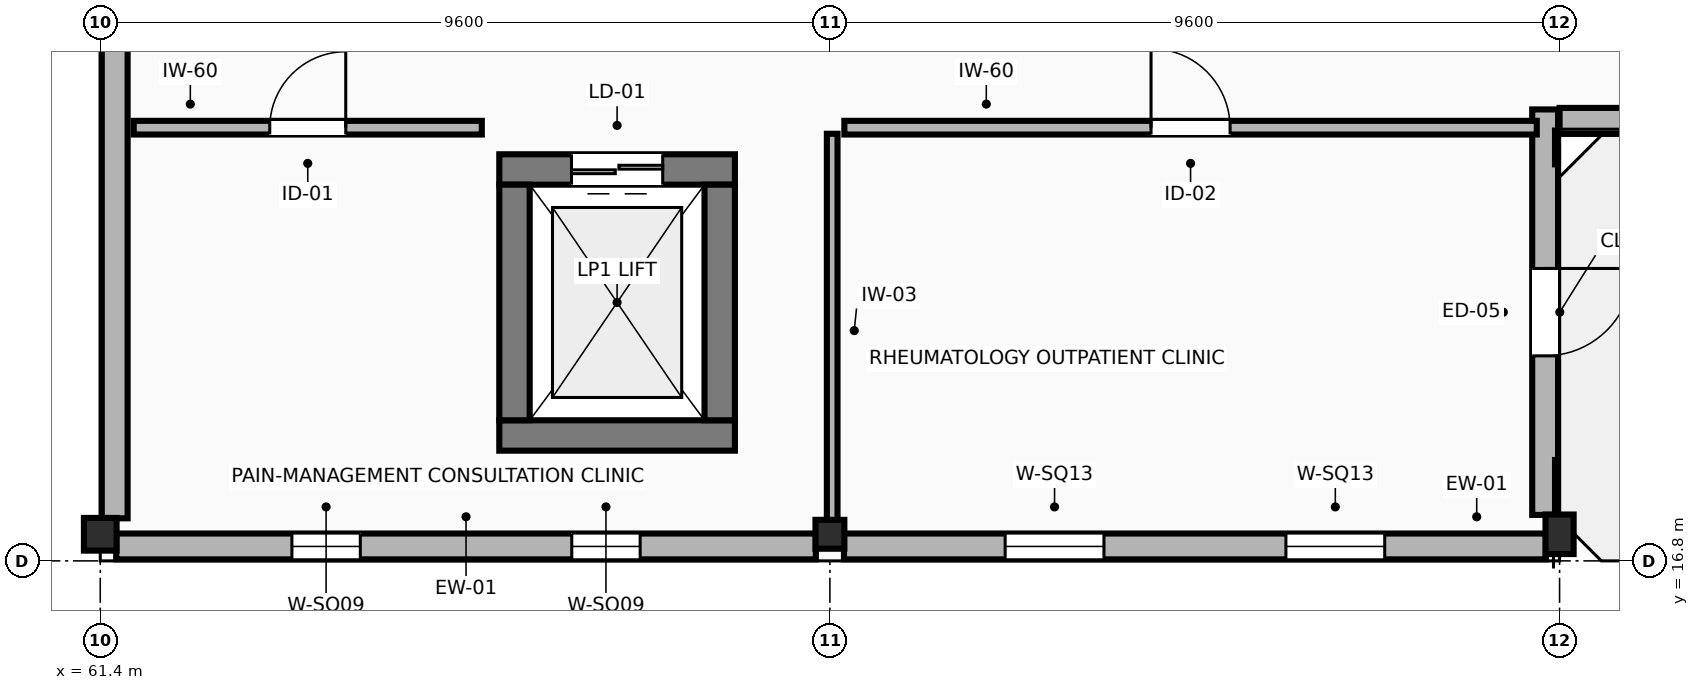
"""IFC4 building model, lengths in metres.
Left out: names, types, materials, properties, quantities, classifications, styles, units other than length and angle.
Written with IfcOpenShell. Run it as: python <this file> out.ifc"""

import sys

from ifc_helpers import new_model, si_unit, direction, frame, frame_2d, origin, origin_2d, place, context, subcontext, project, spatial, rectangle, extrude, element, fill, save


model = new_model("IFC4")
c1 = context("Model", 3, precision=1e-05, world=origin(), true_north=direction((0.0, 1.0)))
c2 = subcontext(c1, "Body", "Model", "MODEL_VIEW")
j1 = project(units=[si_unit("LENGTHUNIT", "METRE"), si_unit("PLANEANGLEUNIT", "RADIAN")], contexts=[c1])
p1 = place(None, origin())
s1 = spatial("IfcSite", under=j1, at=p1, CompositionType="ELEMENT")
p2 = place(p1, origin())
s2 = spatial("IfcBuilding", under=s1, at=p2, CompositionType="ELEMENT")
p3 = place(p2, frame((0.0, 0.0, 18.0)))
s3 = spatial("IfcBuildingStorey", under=s2, at=p3, CompositionType="ELEMENT", Elevation=18.0)
p4 = place(p3, frame((61.4, 17.15, 0.0), z_axis=(0.0, 0.0, 1.0), x_axis=(1.0, 0.0, 0.0)))
e1 = element("IfcColumn", 1, at=p4, inside=s3, PredefinedType="COLUMN", context=c2, shape_type="SweptSolid", body=[
    extrude(rectangle(XDim=0.43, YDim=0.43, at=origin_2d()), origin(), (0.0, 0.0, 1.0), 4.2),
])
p5 = place(p3, frame((71.0, 17.15, 0.0), z_axis=(0.0, 0.0, 1.0), x_axis=(1.0, 0.0, 0.0)))
e2 = element("IfcColumn", 2, at=p5, inside=s3, PredefinedType="COLUMN", context=c2, shape_type="SweptSolid", body=[
    extrude(rectangle(XDim=0.38, YDim=0.38, at=origin_2d()), origin(), (0.0, 0.0, 1.0), 4.2),
])
p6 = place(p3, frame((80.6, 17.15, 0.0), z_axis=(0.0, 0.0, 1.0), x_axis=(1.0, 0.0, 0.0)))
e3 = element("IfcColumn", 3, at=p6, inside=s3, PredefinedType="COLUMN", context=c2, shape_type="SweptSolid", body=[
    extrude(rectangle(XDim=0.37, YDim=0.52, at=origin_2d()), origin(), (0.0, 0.0, 1.0), 4.2),
])
p7 = place(p3, frame((61.61, 16.99, 0.0), z_axis=(0.0, 0.0, 1.0), x_axis=(1.0, 0.0, 0.0)))
e4 = element("IfcWall", 4, at=p7, inside=s3, PredefinedType="STANDARD", context=c2, shape_type="SweptSolid", body=[
    extrude(rectangle(XDim=9.205, YDim=0.34, at=frame_2d((4.603, 0.0))), origin(), (0.0, 0.0, 1.0), 3.205),
])
p8 = place(p7, frame((2.312, 0.0, 0.95)))
e5 = element("IfcOpeningElement", 5, at=p8, cuts=e4, PredefinedType="OPENING", context=c2, shape_type="SweptSolid", body=[
    extrude(rectangle(XDim=0.9, YDim=0.9, at=frame_2d((0.45, 0.45))), frame((0.0, 0.18, 0.0), z_axis=(0.0, -1.0, 0.0), x_axis=(1.0, 0.0, 0.0)), (0.0, 0.0, 1.0), 0.36),
])
p9 = place(p7, frame((5.993, 0.0, 0.95)))
e6 = element("IfcOpeningElement", 6, at=p9, cuts=e4, PredefinedType="OPENING", context=c2, shape_type="SweptSolid", body=[
    extrude(rectangle(XDim=0.9, YDim=0.9, at=frame_2d((0.45, 0.45))), frame((0.0, 0.18, 0.0), z_axis=(0.0, -1.0, 0.0), x_axis=(1.0, 0.0, 0.0)), (0.0, 0.0, 1.0), 0.36),
])
p10 = place(p3, frame((71.185, 16.99, 0.0), z_axis=(0.0, 0.0, 1.0), x_axis=(1.0, 0.0, 0.0)))
e7 = element("IfcWall", 7, at=p10, inside=s3, PredefinedType="STANDARD", context=c2, shape_type="SweptSolid", body=[
    extrude(rectangle(XDim=9.235, YDim=0.34, at=frame_2d((4.617, 0.0))), origin(), (0.0, 0.0, 1.0), 3.205),
])
p11 = place(p10, frame((2.121, 0.0, 1.15)))
e8 = element("IfcOpeningElement", 8, at=p11, cuts=e7, PredefinedType="OPENING", context=c2, shape_type="SweptSolid", body=[
    extrude(rectangle(XDim=1.3, YDim=1.3, at=frame_2d((0.65, 0.65))), frame((0.0, 0.18, 0.0), z_axis=(0.0, -1.0, 0.0), x_axis=(1.0, 0.0, 0.0)), (0.0, 0.0, 1.0), 0.36),
])
p12 = place(p10, frame((5.814, 0.0, 1.15)))
e9 = element("IfcOpeningElement", 9, at=p12, cuts=e7, PredefinedType="OPENING", context=c2, shape_type="SweptSolid", body=[
    extrude(rectangle(XDim=1.3, YDim=1.3, at=frame_2d((0.65, 0.65))), frame((0.0, 0.18, 0.0), z_axis=(0.0, -1.0, 0.0), x_axis=(1.0, 0.0, 0.0)), (0.0, 0.0, 1.0), 0.36),
])
p13 = place(p3, frame((80.41, 17.405, 0.0), z_axis=(0.0, 0.0, 1.0), x_axis=(0.0, 1.0, 0.0)))
e10 = element("IfcWall", 10, at=p13, inside=s3, PredefinedType="STANDARD", context=c2, shape_type="SweptSolid", body=[
    extrude(rectangle(XDim=5.335, YDim=0.34, at=frame_2d((2.667, 0.0))), origin(), (0.0, 0.0, 1.0), 3.425),
])
p14 = place(p13, frame((2.093, 0.0, 0.0)))
e11 = element("IfcOpeningElement", 11, at=p14, cuts=e10, PredefinedType="OPENING", context=c2, shape_type="SweptSolid", body=[
    extrude(rectangle(XDim=1.15, YDim=2.2, at=frame_2d((0.575, 1.1))), frame((0.0, 0.18, 0.0), z_axis=(0.0, -1.0, 0.0), x_axis=(1.0, 0.0, 0.0)), (0.0, 0.0, 1.0), 0.36),
])
p15 = place(p3, frame((80.6, 22.59, 0.0), z_axis=(0.0, 0.0, 1.0), x_axis=(1.0, 0.0, 0.0)))
e12 = element("IfcWall", 12, at=p15, inside=s3, PredefinedType="STANDARD", context=c2, shape_type="SweptSolid", body=[
    extrude(rectangle(XDim=9.6, YDim=0.34, at=frame_2d((4.8, 0.0))), origin(), (0.0, 0.0, 1.0), 3.94),
])
p16 = place(p15, frame((2.205, 0.0, 0.95)))
e13 = element("IfcOpeningElement", 13, at=p16, cuts=e12, PredefinedType="OPENING", context=c2, shape_type="SweptSolid", body=[
    extrude(rectangle(XDim=1.35, YDim=1.6, at=frame_2d((0.675, 0.8))), frame((0.0, 0.18, 0.0), z_axis=(0.0, -1.0, 0.0), x_axis=(1.0, 0.0, 0.0)), (0.0, 0.0, 1.0), 0.36),
])
p17 = place(p15, frame((6.045, 0.0, 0.95)))
e14 = element("IfcOpeningElement", 14, at=p17, cuts=e12, PredefinedType="OPENING", context=c2, shape_type="SweptSolid", body=[
    extrude(rectangle(XDim=1.35, YDim=1.6, at=frame_2d((0.675, 0.8))), frame((0.0, 0.18, 0.0), z_axis=(0.0, -1.0, 0.0), x_axis=(1.0, 0.0, 0.0)), (0.0, 0.0, 1.0), 0.36),
])
p18 = place(p3, frame((61.59, 25.555, 0.0), z_axis=(0.0, 0.0, 1.0), x_axis=(0.0, -1.0, 0.0)))
e15 = element("IfcWall", 15, at=p18, inside=s3, PredefinedType="STANDARD", context=c2, shape_type="SweptSolid", body=[
    extrude(rectangle(XDim=8.195, YDim=0.34, at=frame_2d((4.097, 0.0))), origin(), (0.0, 0.0, 1.0), 2.985),
])
p19 = place(p3, frame((66.65, 18.45, 0.0), z_axis=(0.0, 0.0, 1.0), x_axis=(1.0, 0.0, 0.0)))
e16 = element("IfcWall", 16, at=p19, inside=s3, PredefinedType="SHEAR", context=c2, shape_type="SweptSolid", body=[
    extrude(rectangle(XDim=3.1, YDim=0.4, at=frame_2d((1.55, 0.0))), origin(), (0.0, 0.0, 1.0), 4.2),
])
p20 = place(p3, frame((69.75, 21.95, 0.0), z_axis=(0.0, 0.0, 1.0), x_axis=(-1.0, 0.0, 0.0)))
e17 = element("IfcWall", 17, at=p20, inside=s3, PredefinedType="SHEAR", context=c2, shape_type="SweptSolid", body=[
    extrude(rectangle(XDim=3.1, YDim=0.4, at=frame_2d((1.55, 0.0))), origin(), (0.0, 0.0, 1.0), 4.2),
])
p21 = place(p20, frame((0.95, 0.0, 0.0)))
e18 = element("IfcOpeningElement", 18, at=p21, cuts=e17, PredefinedType="OPENING", context=c2, shape_type="SweptSolid", body=[
    extrude(rectangle(XDim=1.2, YDim=2.2, at=frame_2d((0.6, 1.1))), frame((0.0, 0.21, 0.0), z_axis=(0.0, -1.0, 0.0), x_axis=(1.0, 0.0, 0.0)), (0.0, 0.0, 1.0), 0.42),
])
for number, where, z_axis, x_axis in (
    (19, (66.85, 18.65, 0.0), (0.0, 0.0, 1.0), (0.0, 1.0, 0.0)),
    (20, (69.55, 21.75, 0.0), (0.0, 0.0, 1.0), (0.0, -1.0, 0.0)),
):
    element("IfcWall", number, at=place(p3, frame(where, z_axis=z_axis, x_axis=x_axis)), inside=s3, PredefinedType="SHEAR", context=c2, shape_type="SweptSolid", body=[
        extrude(rectangle(XDim=3.1, YDim=0.4, at=frame_2d((1.55, 0.0))), origin(), (0.0, 0.0, 1.0), 4.2),
    ])
p22 = place(p3, frame((61.84, 22.5, 0.0), z_axis=(0.0, 0.0, 1.0), x_axis=(1.0, 0.0, 0.0)))
e21 = element("IfcWall", 21, at=p22, inside=s3, PredefinedType="PARTITIONING", context=c2, shape_type="SweptSolid", body=[
    extrude(rectangle(XDim=4.58, YDim=0.18, at=frame_2d((2.29, 0.0))), origin(), (0.0, 0.0, 1.0), 3.94),
])
p23 = place(p22, frame((1.79, 0.0, 0.0)))
e22 = element("IfcOpeningElement", 22, at=p23, cuts=e21, PredefinedType="OPENING", context=c2, shape_type="SweptSolid", body=[
    extrude(rectangle(XDim=1.0, YDim=2.15, at=frame_2d((0.5, 1.075))), frame((0.0, 0.1, 0.0), z_axis=(0.0, -1.0, 0.0), x_axis=(1.0, 0.0, 0.0)), (0.0, 0.0, 1.0), 0.2),
])
p24 = place(p3, frame((71.03, 22.42, 0.0), z_axis=(0.0, 0.0, 1.0), x_axis=(0.0, -1.0, 0.0)))
e23 = element("IfcWall", 23, at=p24, inside=s3, PredefinedType="PARTITIONING", context=c2, shape_type="SweptSolid", body=[
    extrude(rectangle(XDim=5.18, YDim=0.14, at=frame_2d((2.59, 0.0))), origin(), (0.0, 0.0, 1.0), 3.425),
])
p25 = place(p3, frame((71.19, 22.5, 0.0), z_axis=(0.0, 0.0, 1.0), x_axis=(1.0, 0.0, 0.0)))
e24 = element("IfcWall", 24, at=p25, inside=s3, PredefinedType="PARTITIONING", context=c2, shape_type="SweptSolid", body=[
    extrude(rectangle(XDim=9.11, YDim=0.18, at=frame_2d((4.555, 0.0))), origin(), (0.0, 0.0, 1.0), 3.94),
])
p26 = place(p25, frame((4.035, 0.0, 0.0)))
e25 = element("IfcOpeningElement", 25, at=p26, cuts=e24, PredefinedType="OPENING", context=c2, shape_type="SweptSolid", body=[
    extrude(rectangle(XDim=1.04, YDim=2.15, at=frame_2d((0.52, 1.075))), frame((0.0, 0.1, 0.0), z_axis=(0.0, -1.0, 0.0), x_axis=(1.0, 0.0, 0.0)), (0.0, 0.0, 1.0), 0.2),
])
p27 = place(p8, origin())
e26 = element("IfcWindow", 26, at=p27, inside=s3, PartitioningType="SINGLE_PANEL", PredefinedType="WINDOW", context=c2, shape_type="SweptSolid", body=[
    extrude(rectangle(XDim=0.9, YDim=0.9, at=frame_2d((0.45, 0.45))), frame((0.0, 0.03, 0.0), z_axis=(0.0, -1.0, 0.0), x_axis=(1.0, 0.0, 0.0)), (0.0, 0.0, 1.0), 0.06),
])
fill(e5, e26)
p28 = place(p9, origin())
e27 = element("IfcWindow", 27, at=p28, inside=s3, PartitioningType="SINGLE_PANEL", PredefinedType="WINDOW", context=c2, shape_type="SweptSolid", body=[
    extrude(rectangle(XDim=0.9, YDim=0.9, at=frame_2d((0.45, 0.45))), frame((0.0, 0.03, 0.0), z_axis=(0.0, -1.0, 0.0), x_axis=(1.0, 0.0, 0.0)), (0.0, 0.0, 1.0), 0.06),
])
fill(e6, e27)
p29 = place(p11, origin())
e28 = element("IfcWindow", 28, at=p29, inside=s3, PartitioningType="SINGLE_PANEL", PredefinedType="WINDOW", context=c2, shape_type="SweptSolid", body=[
    extrude(rectangle(XDim=1.3, YDim=1.3, at=frame_2d((0.65, 0.65))), frame((0.0, 0.03, 0.0), z_axis=(0.0, -1.0, 0.0), x_axis=(1.0, 0.0, 0.0)), (0.0, 0.0, 1.0), 0.06),
])
fill(e8, e28)
p30 = place(p12, origin())
e29 = element("IfcWindow", 29, at=p30, inside=s3, PartitioningType="SINGLE_PANEL", PredefinedType="WINDOW", context=c2, shape_type="SweptSolid", body=[
    extrude(rectangle(XDim=1.3, YDim=1.3, at=frame_2d((0.65, 0.65))), frame((0.0, 0.03, 0.0), z_axis=(0.0, -1.0, 0.0), x_axis=(1.0, 0.0, 0.0)), (0.0, 0.0, 1.0), 0.06),
])
fill(e9, e29)
p31 = place(p14, frame((1.15, 0.0, 0.0), z_axis=(0.0, 0.0, 1.0), x_axis=(-1.0, 0.0, 0.0)))
e30 = element("IfcDoor", 30, at=p31, inside=s3, OperationType="SINGLE_SWING_LEFT", PredefinedType="DOOR", context=c2, shape_type="SweptSolid", body=[
    extrude(rectangle(XDim=1.15, YDim=2.2, at=frame_2d((0.575, 1.1))), frame((0.0, 0.025, 0.0), z_axis=(0.0, -1.0, 0.0), x_axis=(1.0, 0.0, 0.0)), (0.0, 0.0, 1.0), 0.05),
])
fill(e11, e30)
p32 = place(p21, origin())
e31 = element("IfcDoor", 31, at=p32, inside=s3, OperationType="DOUBLE_DOOR_SLIDING", PredefinedType="DOOR", context=c2, shape_type="SweptSolid", body=[
    extrude(rectangle(XDim=1.2, YDim=2.2, at=frame_2d((0.6, 1.1))), frame((0.0, 0.025, 0.0), z_axis=(0.0, -1.0, 0.0), x_axis=(1.0, 0.0, 0.0)), (0.0, 0.0, 1.0), 0.05),
])
fill(e18, e31)
p33 = place(p23, origin())
e32 = element("IfcDoor", 32, at=p33, inside=s3, OperationType="SINGLE_SWING_RIGHT", PredefinedType="DOOR", context=c2, shape_type="SweptSolid", body=[
    extrude(rectangle(XDim=1.0, YDim=2.15, at=frame_2d((0.5, 1.075))), frame((0.0, 0.025, 0.0), z_axis=(0.0, -1.0, 0.0), x_axis=(1.0, 0.0, 0.0)), (0.0, 0.0, 1.0), 0.05),
])
fill(e22, e32)
p34 = place(p26, origin())
e33 = element("IfcDoor", 33, at=p34, inside=s3, OperationType="SINGLE_SWING_LEFT", PredefinedType="DOOR", context=c2, shape_type="SweptSolid", body=[
    extrude(rectangle(XDim=1.04, YDim=2.15, at=frame_2d((0.52, 1.075))), frame((0.0, 0.025, 0.0), z_axis=(0.0, -1.0, 0.0), x_axis=(1.0, 0.0, 0.0)), (0.0, 0.0, 1.0), 0.05),
])
fill(e25, e33)
save(model, sys.argv[1])
